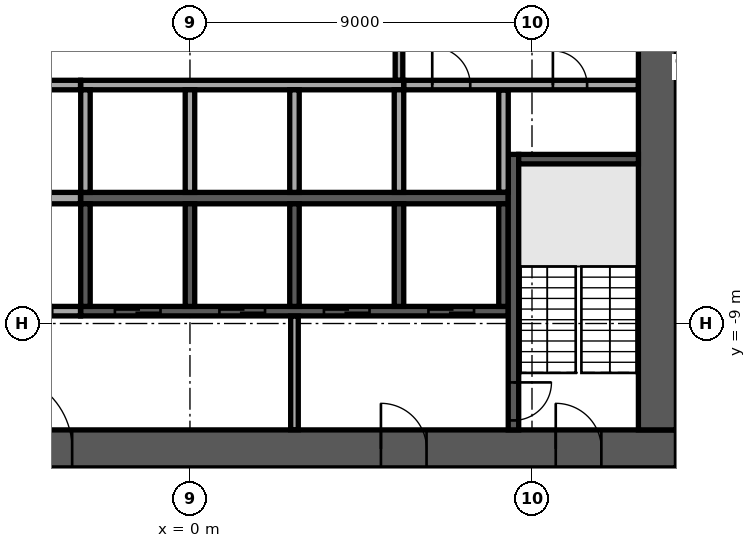
"""IFC4 building model, lengths in metres.
Left out: names, types, materials, properties, quantities, classifications, styles, units other than length and angle.
Written with IfcOpenShell. Run it as: python <this file> out.ifc"""

import sys

from ifc_helpers import new_model, si_unit, direction, frame, frame_2d, origin, place, context, subcontext, project, spatial, rectangle, extrude, element, fill, save


model = new_model("IFC4")
c1 = context("Model", 3, precision=1e-05, world=origin(), true_north=direction((0.0, 1.0)))
c2 = subcontext(c1, "Body", "Model", "MODEL_VIEW")
j1 = project(units=[si_unit("LENGTHUNIT", "METRE"), si_unit("PLANEANGLEUNIT", "RADIAN")], contexts=[c1])
p1 = place(None, origin())
s1 = spatial("IfcSite", under=j1, at=p1, CompositionType="ELEMENT")
p2 = place(p1, origin())
s2 = spatial("IfcBuilding", under=s1, at=p2, CompositionType="ELEMENT")
p3 = place(p2, frame((0.0, 0.0, 163.7)))
s3 = spatial("IfcBuildingStorey", under=s2, at=p3, CompositionType="ELEMENT", Elevation=163.7)
p4 = place(p3, frame((-12.8, -12.3, 0.0), z_axis=(0.0, 0.0, 1.0), x_axis=(1.0, 0.0, 0.0)))
e1 = element("IfcWall", 1, at=p4, inside=s3, PredefinedType="SHEAR", context=c2, shape_type="SweptSolid", body=[
    extrude(rectangle(XDim=25.6, YDim=1.0, at=frame_2d((12.8, 0.0))), origin(), (0.0, 0.0, 1.0), 3.6),
])
p5 = place(p4, frame((7.7, 0.0, 0.0)))
e2 = element("IfcOpeningElement", 2, at=p5, cuts=e1, PredefinedType="OPENING", context=c2, shape_type="SweptSolid", body=[
    extrude(rectangle(XDim=2.0, YDim=2.1, at=frame_2d((1.0, 1.05))), frame((0.0, 0.51, 0.0), z_axis=(0.0, -1.0, 0.0), x_axis=(1.0, 0.0, 0.0)), (0.0, 0.0, 1.0), 1.02),
])
p6 = place(p4, frame((17.825, 0.0, 0.0)))
e3 = element("IfcOpeningElement", 3, at=p6, cuts=e1, PredefinedType="OPENING", context=c2, shape_type="SweptSolid", body=[
    extrude(rectangle(XDim=1.2, YDim=2.1, at=frame_2d((0.6, 1.05))), frame((0.0, 0.51, 0.0), z_axis=(0.0, -1.0, 0.0), x_axis=(1.0, 0.0, 0.0)), (0.0, 0.0, 1.0), 1.02),
])
p7 = place(p4, frame((1.975, 0.0, 0.0)))
e4 = element("IfcOpeningElement", 4, at=p7, cuts=e1, PredefinedType="OPENING", context=c2, shape_type="SweptSolid", body=[
    extrude(rectangle(XDim=1.2, YDim=2.1, at=frame_2d((0.6, 1.05))), frame((0.0, 0.51, 0.0), z_axis=(0.0, -1.0, 0.0), x_axis=(1.0, 0.0, 0.0)), (0.0, 0.0, 1.0), 1.02),
])
p8 = place(p4, frame((22.425, 0.0, 0.0)))
e5 = element("IfcOpeningElement", 5, at=p8, cuts=e1, PredefinedType="OPENING", context=c2, shape_type="SweptSolid", body=[
    extrude(rectangle(XDim=1.2, YDim=2.1, at=frame_2d((0.6, 1.05))), frame((0.0, 0.51, 0.0), z_axis=(0.0, -1.0, 0.0), x_axis=(1.0, 0.0, 0.0)), (0.0, 0.0, 1.0), 1.02),
])
p9 = place(p3, frame((12.3, -11.8, 0.0), z_axis=(0.0, 0.0, 1.0), x_axis=(0.0, 1.0, 0.0)))
e6 = element("IfcWall", 6, at=p9, inside=s3, PredefinedType="SHEAR", context=c2, shape_type="SweptSolid", body=[
    extrude(rectangle(XDim=23.6, YDim=1.0, at=frame_2d((11.8, 0.0))), origin(), (0.0, 0.0, 1.0), 3.6),
])
p10 = place(p9, frame((10.6, 0.0, 0.0)))
e7 = element("IfcOpeningElement", 7, at=p10, cuts=e6, PredefinedType="OPENING", context=c2, shape_type="SweptSolid", body=[
    extrude(rectangle(XDim=2.4, YDim=2.4, at=frame_2d((1.2, 1.2))), frame((0.0, 0.51, 0.0), z_axis=(0.0, -1.0, 0.0), x_axis=(1.0, 0.0, 0.0)), (0.0, 0.0, 1.0), 1.02),
])
p11 = place(p3, frame((-2.875, -5.7, 0.0), z_axis=(0.0, 0.0, 1.0), x_axis=(1.0, 0.0, 0.0)))
e8 = element("IfcWall", 8, at=p11, inside=s3, PredefinedType="SOLIDWALL", context=c2, shape_type="SweptSolid", body=[
    extrude(rectangle(XDim=11.25, YDim=0.3, at=frame_2d((5.625, 0.0))), origin(), (0.0, 0.0, 1.0), 3.6),
])
p12 = place(p3, frame((-2.875, -2.725, 0.0), z_axis=(0.0, 0.0, 1.0), x_axis=(1.0, 0.0, 0.0)))
e9 = element("IfcWall", 9, at=p12, inside=s3, PredefinedType="SOLIDWALL", context=c2, shape_type="SweptSolid", body=[
    extrude(rectangle(XDim=8.5, YDim=0.25, at=frame_2d((4.25, 0.0))), origin(), (0.0, 0.0, 1.0), 3.6),
])
for number, where, z_axis, x_axis in (
    (10, (-2.75, -5.55, 0.0), (0.0, 0.0, 1.0), (0.0, 1.0, 0.0)),
    (11, (0.0, -5.55, 0.0), (0.0, 0.0, 1.0), (0.0, 1.0, 0.0)),
    (12, (2.75, -5.55, 0.0), (0.0, 0.0, 1.0), (0.0, 1.0, 0.0)),
    (13, (5.5, -5.55, 0.0), (0.0, 0.0, 1.0), (0.0, 1.0, 0.0)),
):
    element("IfcWall", number, at=place(p3, frame(where, z_axis=z_axis, x_axis=x_axis)), inside=s3, PredefinedType="SOLIDWALL", context=c2, shape_type="SweptSolid", body=[
        extrude(rectangle(XDim=2.7, YDim=0.25, at=frame_2d((1.35, 0.0))), origin(), (0.0, 0.0, 1.0), 3.6),
    ])
p13 = place(p3, frame((-2.875, -8.675, 0.0), z_axis=(0.0, 0.0, 1.0), x_axis=(1.0, 0.0, 0.0)))
e14 = element("IfcWall", 14, at=p13, inside=s3, PredefinedType="SOLIDWALL", context=c2, shape_type="SweptSolid", body=[
    extrude(rectangle(XDim=11.25, YDim=0.25, at=frame_2d((5.625, 0.0))), origin(), (0.0, 0.0, 1.0), 3.6),
])
p14 = place(p13, frame((0.9, 0.0, 0.0)))
e15 = element("IfcOpeningElement", 15, at=p14, cuts=e14, PredefinedType="OPENING", context=c2, shape_type="SweptSolid", body=[
    extrude(rectangle(XDim=1.2, YDim=2.1, at=frame_2d((0.6, 1.05))), frame((0.0, 0.135, 0.0), z_axis=(0.0, -1.0, 0.0), x_axis=(1.0, 0.0, 0.0)), (0.0, 0.0, 1.0), 0.27),
])
p15 = place(p13, frame((3.65, 0.0, 0.0)))
e16 = element("IfcOpeningElement", 16, at=p15, cuts=e14, PredefinedType="OPENING", context=c2, shape_type="SweptSolid", body=[
    extrude(rectangle(XDim=1.2, YDim=2.1, at=frame_2d((0.6, 1.05))), frame((0.0, 0.135, 0.0), z_axis=(0.0, -1.0, 0.0), x_axis=(1.0, 0.0, 0.0)), (0.0, 0.0, 1.0), 0.27),
])
p16 = place(p13, frame((6.4, 0.0, 0.0)))
e17 = element("IfcOpeningElement", 17, at=p16, cuts=e14, PredefinedType="OPENING", context=c2, shape_type="SweptSolid", body=[
    extrude(rectangle(XDim=1.2, YDim=2.1, at=frame_2d((0.6, 1.05))), frame((0.0, 0.135, 0.0), z_axis=(0.0, -1.0, 0.0), x_axis=(1.0, 0.0, 0.0)), (0.0, 0.0, 1.0), 0.27),
])
p17 = place(p13, frame((9.15, 0.0, 0.0)))
e18 = element("IfcOpeningElement", 18, at=p17, cuts=e14, PredefinedType="OPENING", context=c2, shape_type="SweptSolid", body=[
    extrude(rectangle(XDim=1.2, YDim=2.1, at=frame_2d((0.6, 1.05))), frame((0.0, 0.135, 0.0), z_axis=(0.0, -1.0, 0.0), x_axis=(1.0, 0.0, 0.0)), (0.0, 0.0, 1.0), 0.27),
])
for number, where, z_axis, x_axis in (
    (19, (-2.75, -8.55, 0.0), (0.0, 0.0, 1.0), (0.0, 1.0, 0.0)),
    (20, (0.0, -8.55, 0.0), (0.0, 0.0, 1.0), (0.0, 1.0, 0.0)),
    (21, (2.75, -8.55, 0.0), (0.0, 0.0, 1.0), (0.0, 1.0, 0.0)),
    (22, (5.5, -8.55, 0.0), (0.0, 0.0, 1.0), (0.0, 1.0, 0.0)),
    (23, (8.25, -8.55, 0.0), (0.0, 0.0, 1.0), (0.0, 1.0, 0.0)),
):
    element("IfcWall", number, at=place(p3, frame(where, z_axis=z_axis, x_axis=x_axis)), inside=s3, PredefinedType="SOLIDWALL", context=c2, shape_type="SweptSolid", body=[
        extrude(rectangle(XDim=2.7, YDim=0.25, at=frame_2d((1.35, 0.0))), origin(), (0.0, 0.0, 1.0), 3.6),
    ])
p18 = place(p3, frame((8.512, -4.55, 0.0), z_axis=(0.0, 0.0, 1.0), x_axis=(0.0, -1.0, 0.0)))
e24 = element("IfcWall", 24, at=p18, inside=s3, PredefinedType="SOLIDWALL", context=c2, shape_type="SweptSolid", body=[
    extrude(rectangle(XDim=7.25, YDim=0.275, at=frame_2d((3.625, 0.0))), origin(), (0.0, 0.0, 1.0), 3.6),
])
p19 = place(p18, frame((6.0, 0.0, 0.0)))
e25 = element("IfcOpeningElement", 25, at=p19, cuts=e24, PredefinedType="OPENING", context=c2, shape_type="SweptSolid", body=[
    extrude(rectangle(XDim=1.0, YDim=2.1, at=frame_2d((0.5, 1.05))), frame((0.0, 0.147, 0.0), z_axis=(0.0, -1.0, 0.0), x_axis=(1.0, 0.0, 0.0)), (0.0, 0.0, 1.0), 0.295),
])
p20 = place(p3, frame((8.65, -4.675, 0.0), z_axis=(0.0, 0.0, 1.0), x_axis=(1.0, 0.0, 0.0)))
e26 = element("IfcWall", 26, at=p20, inside=s3, PredefinedType="SOLIDWALL", context=c2, shape_type="SweptSolid", body=[
    extrude(rectangle(XDim=3.15, YDim=0.25, at=frame_2d((1.575, 0.0))), origin(), (0.0, 0.0, 1.0), 3.6),
])
p21 = place(p3, frame((2.75, -11.795, 0.0), z_axis=(0.0, 0.0, 1.0), x_axis=(0.0, 1.0, 0.0)))
e27 = element("IfcWall", 27, at=p21, inside=s3, PredefinedType="PARTITIONING", context=c2, shape_type="SweptSolid", body=[
    extrude(rectangle(XDim=2.99, YDim=0.2, at=frame_2d((1.495, 0.0))), origin(), (0.0, 0.0, 1.0), 3.6),
])
p22 = place(p3, frame((-8.37, -8.675, 0.0), z_axis=(0.0, 0.0, 1.0), x_axis=(1.0, 0.0, 0.0)))
e28 = element("IfcWall", 28, at=p22, inside=s3, PredefinedType="PARTITIONING", context=c2, shape_type="SweptSolid", body=[
    extrude(rectangle(XDim=5.49, YDim=0.25, at=frame_2d((2.745, 0.0))), origin(), (0.0, 0.0, 1.0), 3.6),
])
p23 = place(p22, frame((0.995, 0.0, 0.0)))
e29 = element("IfcOpeningElement", 29, at=p23, cuts=e28, PredefinedType="OPENING", context=c2, shape_type="SweptSolid", body=[
    extrude(rectangle(XDim=1.0, YDim=2.1, at=frame_2d((0.5, 1.05))), frame((0.0, 0.135, 0.0), z_axis=(0.0, -1.0, 0.0), x_axis=(1.0, 0.0, 0.0)), (0.0, 0.0, 1.0), 0.27),
])
p24 = place(p22, frame((3.745, 0.0, 0.0)))
e30 = element("IfcOpeningElement", 30, at=p24, cuts=e28, PredefinedType="OPENING", context=c2, shape_type="SweptSolid", body=[
    extrude(rectangle(XDim=1.0, YDim=2.1, at=frame_2d((0.5, 1.05))), frame((0.0, 0.135, 0.0), z_axis=(0.0, -1.0, 0.0), x_axis=(1.0, 0.0, 0.0)), (0.0, 0.0, 1.0), 0.27),
])
p25 = place(p3, frame((-8.35, -5.7, 0.0), z_axis=(0.0, 0.0, 1.0), x_axis=(1.0, 0.0, 0.0)))
e31 = element("IfcWall", 31, at=p25, inside=s3, PredefinedType="PARTITIONING", context=c2, shape_type="SweptSolid", body=[
    extrude(rectangle(XDim=5.47, YDim=0.3, at=frame_2d((2.735, 0.0))), origin(), (0.0, 0.0, 1.0), 3.6),
])
p26 = place(p3, frame((8.25, -5.545, 0.0), z_axis=(0.0, 0.0, 1.0), x_axis=(0.0, 1.0, 0.0)))
e32 = element("IfcWall", 32, at=p26, inside=s3, PredefinedType="PARTITIONING", context=c2, shape_type="SweptSolid", body=[
    extrude(rectangle(XDim=2.69, YDim=0.25, at=frame_2d((1.345, 0.0))), origin(), (0.0, 0.0, 1.0), 3.6),
])
p27 = place(p3, frame((-11.795, -2.725, 0.0), z_axis=(0.0, 0.0, 1.0), x_axis=(1.0, 0.0, 0.0)))
e33 = element("IfcWall", 33, at=p27, inside=s3, PredefinedType="PARTITIONING", context=c2, shape_type="SweptSolid", body=[
    extrude(rectangle(XDim=8.915, YDim=0.25, at=frame_2d((4.458, 0.0))), origin(), (0.0, 0.0, 1.0), 3.6),
])
p28 = place(p27, frame((1.295, 0.0, 0.0)))
e34 = element("IfcOpeningElement", 34, at=p28, cuts=e33, PredefinedType="OPENING", context=c2, shape_type="SweptSolid", body=[
    extrude(rectangle(XDim=1.0, YDim=2.1, at=frame_2d((0.5, 1.05))), frame((0.0, 0.135, 0.0), z_axis=(0.0, -1.0, 0.0), x_axis=(1.0, 0.0, 0.0)), (0.0, 0.0, 1.0), 0.27),
])
p29 = place(p27, frame((4.42, 0.0, 0.0)))
e35 = element("IfcOpeningElement", 35, at=p29, cuts=e33, PredefinedType="OPENING", context=c2, shape_type="SweptSolid", body=[
    extrude(rectangle(XDim=1.0, YDim=2.1, at=frame_2d((0.5, 1.05))), frame((0.0, 0.135, 0.0), z_axis=(0.0, -1.0, 0.0), x_axis=(1.0, 0.0, 0.0)), (0.0, 0.0, 1.0), 0.27),
])
p30 = place(p3, frame((5.63, -2.725, 0.0), z_axis=(0.0, 0.0, 1.0), x_axis=(1.0, 0.0, 0.0)))
e36 = element("IfcWall", 36, at=p30, inside=s3, PredefinedType="PARTITIONING", context=c2, shape_type="SweptSolid", body=[
    extrude(rectangle(XDim=6.165, YDim=0.25, at=frame_2d((3.083, 0.0))), origin(), (0.0, 0.0, 1.0), 3.6),
])
p31 = place(p30, frame((0.745, 0.0, 0.0)))
e37 = element("IfcOpeningElement", 37, at=p31, cuts=e36, PredefinedType="OPENING", context=c2, shape_type="SweptSolid", body=[
    extrude(rectangle(XDim=1.0, YDim=2.1, at=frame_2d((0.5, 1.05))), frame((0.0, 0.135, 0.0), z_axis=(0.0, -1.0, 0.0), x_axis=(1.0, 0.0, 0.0)), (0.0, 0.0, 1.0), 0.27),
])
p32 = place(p30, frame((3.92, 0.0, 0.0)))
e38 = element("IfcOpeningElement", 38, at=p32, cuts=e36, PredefinedType="OPENING", context=c2, shape_type="SweptSolid", body=[
    extrude(rectangle(XDim=0.9, YDim=2.1, at=frame_2d((0.45, 1.05))), frame((0.0, 0.135, 0.0), z_axis=(0.0, -1.0, 0.0), x_axis=(1.0, 0.0, 0.0)), (0.0, 0.0, 1.0), 0.27),
])
p33 = place(p3, frame((5.5, -2.595, 0.0), z_axis=(0.0, 0.0, 1.0), x_axis=(0.0, 1.0, 0.0)))
e39 = element("IfcWall", 39, at=p33, inside=s3, PredefinedType="PARTITIONING", context=c2, shape_type="SweptSolid", body=[
    extrude(rectangle(XDim=5.19, YDim=0.2, at=frame_2d((2.595, 0.0))), origin(), (0.0, 0.0, 1.0), 3.6),
])
p34 = place(p33, frame((1.395, 0.0, 0.0)))
e40 = element("IfcOpeningElement", 40, at=p34, cuts=e39, PredefinedType="OPENING", context=c2, shape_type="SweptSolid", body=[
    extrude(rectangle(XDim=2.4, YDim=2.4, at=frame_2d((1.2, 1.2))), frame((0.0, 0.11, 0.0), z_axis=(0.0, -1.0, 0.0), x_axis=(1.0, 0.0, 0.0)), (0.0, 0.0, 1.0), 0.22),
])
p35 = place(p3, frame((-4.784, -35.737, 0.0), z_axis=(0.0, 0.0, 1.0), x_axis=(0.809019283075, 0.587782102154, 0.0)))
e41 = element("IfcWall", 41, at=p35, inside=s3, PredefinedType="STANDARD", context=c2, shape_type="SweptSolid", body=[
    extrude(rectangle(XDim=49.751, YDim=0.6, at=frame_2d((24.875, 0.0))), origin(), (0.0, 0.0, 1.0), 3.6),
])
p36 = place(p35, frame((1.161, 0.0, 0.9)))
e42 = element("IfcOpeningElement", 42, at=p36, cuts=e41, PredefinedType="OPENING", context=c2, shape_type="SweptSolid", body=[
    extrude(rectangle(XDim=2.1, YDim=2.1, at=frame_2d((1.05, 1.05))), frame((0.0, 0.31, 0.0), z_axis=(0.0, -1.0, 0.0), x_axis=(1.0, 0.0, 0.0)), (0.0, 0.0, 1.0), 0.62),
])
p37 = place(p35, frame((5.644, 0.0, 0.9)))
e43 = element("IfcOpeningElement", 43, at=p37, cuts=e41, PredefinedType="OPENING", context=c2, shape_type="SweptSolid", body=[
    extrude(rectangle(XDim=2.1, YDim=2.1, at=frame_2d((1.05, 1.05))), frame((0.0, 0.31, 0.0), z_axis=(0.0, -1.0, 0.0), x_axis=(1.0, 0.0, 0.0)), (0.0, 0.0, 1.0), 0.62),
])
p38 = place(p35, frame((10.189, 0.0, 0.9)))
e44 = element("IfcOpeningElement", 44, at=p38, cuts=e41, PredefinedType="OPENING", context=c2, shape_type="SweptSolid", body=[
    extrude(rectangle(XDim=2.1, YDim=2.1, at=frame_2d((1.05, 1.05))), frame((0.0, 0.31, 0.0), z_axis=(0.0, -1.0, 0.0), x_axis=(1.0, 0.0, 0.0)), (0.0, 0.0, 1.0), 0.62),
])
p39 = place(p35, frame((14.735, 0.0, 0.9)))
e45 = element("IfcOpeningElement", 45, at=p39, cuts=e41, PredefinedType="OPENING", context=c2, shape_type="SweptSolid", body=[
    extrude(rectangle(XDim=2.1, YDim=2.1, at=frame_2d((1.05, 1.05))), frame((0.0, 0.31, 0.0), z_axis=(0.0, -1.0, 0.0), x_axis=(1.0, 0.0, 0.0)), (0.0, 0.0, 1.0), 0.62),
])
p40 = place(p35, frame((19.28, 0.0, 0.9)))
e46 = element("IfcOpeningElement", 46, at=p40, cuts=e41, PredefinedType="OPENING", context=c2, shape_type="SweptSolid", body=[
    extrude(rectangle(XDim=2.1, YDim=2.1, at=frame_2d((1.05, 1.05))), frame((0.0, 0.31, 0.0), z_axis=(0.0, -1.0, 0.0), x_axis=(1.0, 0.0, 0.0)), (0.0, 0.0, 1.0), 0.62),
])
p41 = place(p35, frame((23.826, 0.0, 0.9)))
e47 = element("IfcOpeningElement", 47, at=p41, cuts=e41, PredefinedType="OPENING", context=c2, shape_type="SweptSolid", body=[
    extrude(rectangle(XDim=2.1, YDim=2.1, at=frame_2d((1.05, 1.05))), frame((0.0, 0.31, 0.0), z_axis=(0.0, -1.0, 0.0), x_axis=(1.0, 0.0, 0.0)), (0.0, 0.0, 1.0), 0.62),
])
p42 = place(p35, frame((28.371, 0.0, 0.9)))
e48 = element("IfcOpeningElement", 48, at=p42, cuts=e41, PredefinedType="OPENING", context=c2, shape_type="SweptSolid", body=[
    extrude(rectangle(XDim=2.1, YDim=2.1, at=frame_2d((1.05, 1.05))), frame((0.0, 0.31, 0.0), z_axis=(0.0, -1.0, 0.0), x_axis=(1.0, 0.0, 0.0)), (0.0, 0.0, 1.0), 0.62),
])
p43 = place(p35, frame((32.917, 0.0, 0.9)))
e49 = element("IfcOpeningElement", 49, at=p43, cuts=e41, PredefinedType="OPENING", context=c2, shape_type="SweptSolid", body=[
    extrude(rectangle(XDim=2.1, YDim=2.1, at=frame_2d((1.05, 1.05))), frame((0.0, 0.31, 0.0), z_axis=(0.0, -1.0, 0.0), x_axis=(1.0, 0.0, 0.0)), (0.0, 0.0, 1.0), 0.62),
])
p44 = place(p35, frame((37.462, 0.0, 0.9)))
e50 = element("IfcOpeningElement", 50, at=p44, cuts=e41, PredefinedType="OPENING", context=c2, shape_type="SweptSolid", body=[
    extrude(rectangle(XDim=2.1, YDim=2.1, at=frame_2d((1.05, 1.05))), frame((0.0, 0.31, 0.0), z_axis=(0.0, -1.0, 0.0), x_axis=(1.0, 0.0, 0.0)), (0.0, 0.0, 1.0), 0.62),
])
p45 = place(p35, frame((42.008, 0.0, 0.9)))
e51 = element("IfcOpeningElement", 51, at=p45, cuts=e41, PredefinedType="OPENING", context=c2, shape_type="SweptSolid", body=[
    extrude(rectangle(XDim=2.1, YDim=2.1, at=frame_2d((1.05, 1.05))), frame((0.0, 0.31, 0.0), z_axis=(0.0, -1.0, 0.0), x_axis=(1.0, 0.0, 0.0)), (0.0, 0.0, 1.0), 0.62),
])
p46 = place(p35, frame((46.491, 0.0, 0.9)))
e52 = element("IfcOpeningElement", 52, at=p46, cuts=e41, PredefinedType="OPENING", context=c2, shape_type="SweptSolid", body=[
    extrude(rectangle(XDim=2.1, YDim=2.1, at=frame_2d((1.05, 1.05))), frame((0.0, 0.31, 0.0), z_axis=(0.0, -1.0, 0.0), x_axis=(1.0, 0.0, 0.0)), (0.0, 0.0, 1.0), 0.62),
])
p47 = place(p3, frame((-3.509, -26.309, 0.0), z_axis=(0.0, 0.0, 1.0), x_axis=(0.809024097608, 0.587775475407, 0.0)))
e53 = element("IfcWall", 53, at=p47, inside=s3, PredefinedType="PARTITIONING", context=c2, shape_type="SweptSolid", body=[
    extrude(rectangle(XDim=36.68, YDim=0.15, at=frame_2d((18.34, 0.0))), origin(), (0.0, 0.0, 1.0), 3.15),
])
p48 = place(p47, frame((5.361, 0.0, 0.0)))
e54 = element("IfcOpeningElement", 54, at=p48, cuts=e53, PredefinedType="OPENING", context=c2, shape_type="SweptSolid", body=[
    extrude(rectangle(XDim=1.0, YDim=2.1, at=frame_2d((0.5, 1.05))), frame((0.0, 0.085, 0.0), z_axis=(0.0, -1.0, 0.0), x_axis=(1.0, 0.0, 0.0)), (0.0, 0.0, 1.0), 0.17),
])
p49 = place(p47, frame((12.913, 0.0, 0.0)))
e55 = element("IfcOpeningElement", 55, at=p49, cuts=e53, PredefinedType="OPENING", context=c2, shape_type="SweptSolid", body=[
    extrude(rectangle(XDim=1.0, YDim=2.1, at=frame_2d((0.5, 1.05))), frame((0.0, 0.085, 0.0), z_axis=(0.0, -1.0, 0.0), x_axis=(1.0, 0.0, 0.0)), (0.0, 0.0, 1.0), 0.17),
])
p50 = place(p47, frame((27.576, 0.0, 0.0)))
e56 = element("IfcOpeningElement", 56, at=p50, cuts=e53, PredefinedType="OPENING", context=c2, shape_type="SweptSolid", body=[
    extrude(rectangle(XDim=1.0, YDim=2.1, at=frame_2d((0.5, 1.05))), frame((0.0, 0.085, 0.0), z_axis=(0.0, -1.0, 0.0), x_axis=(1.0, 0.0, 0.0)), (0.0, 0.0, 1.0), 0.17),
])
p51 = place(p5, origin())
e57 = element("IfcDoor", 57, at=p51, inside=s3, OperationType="SINGLE_SWING_LEFT", PredefinedType="DOOR", context=c2, shape_type="SweptSolid", body=[
    extrude(rectangle(XDim=2.0, YDim=2.1, at=frame_2d((1.0, 1.05))), frame((0.0, 0.025, 0.0), z_axis=(0.0, -1.0, 0.0), x_axis=(1.0, 0.0, 0.0)), (0.0, 0.0, 1.0), 0.05),
])
fill(e2, e57)
p52 = place(p6, origin())
e58 = element("IfcDoor", 58, at=p52, inside=s3, OperationType="SINGLE_SWING_LEFT", PredefinedType="DOOR", context=c2, shape_type="SweptSolid", body=[
    extrude(rectangle(XDim=1.2, YDim=2.1, at=frame_2d((0.6, 1.05))), frame((0.0, 0.025, 0.0), z_axis=(0.0, -1.0, 0.0), x_axis=(1.0, 0.0, 0.0)), (0.0, 0.0, 1.0), 0.05),
])
fill(e3, e58)
p53 = place(p8, origin())
e59 = element("IfcDoor", 59, at=p53, inside=s3, OperationType="SINGLE_SWING_LEFT", PredefinedType="DOOR", context=c2, shape_type="SweptSolid", body=[
    extrude(rectangle(XDim=1.2, YDim=2.1, at=frame_2d((0.6, 1.05))), frame((0.0, 0.025, 0.0), z_axis=(0.0, -1.0, 0.0), x_axis=(1.0, 0.0, 0.0)), (0.0, 0.0, 1.0), 0.05),
])
fill(e5, e59)
p54 = place(p14, origin())
e60 = element("IfcDoor", 60, at=p54, inside=s3, OperationType="DOUBLE_DOOR_SLIDING", PredefinedType="DOOR", context=c2, shape_type="SweptSolid", body=[
    extrude(rectangle(XDim=1.2, YDim=2.1, at=frame_2d((0.6, 1.05))), frame((0.0, 0.025, 0.0), z_axis=(0.0, -1.0, 0.0), x_axis=(1.0, 0.0, 0.0)), (0.0, 0.0, 1.0), 0.05),
])
fill(e15, e60)
p55 = place(p15, origin())
e61 = element("IfcDoor", 61, at=p55, inside=s3, OperationType="DOUBLE_DOOR_SLIDING", PredefinedType="DOOR", context=c2, shape_type="SweptSolid", body=[
    extrude(rectangle(XDim=1.2, YDim=2.1, at=frame_2d((0.6, 1.05))), frame((0.0, 0.025, 0.0), z_axis=(0.0, -1.0, 0.0), x_axis=(1.0, 0.0, 0.0)), (0.0, 0.0, 1.0), 0.05),
])
fill(e16, e61)
p56 = place(p16, origin())
e62 = element("IfcDoor", 62, at=p56, inside=s3, OperationType="DOUBLE_DOOR_SLIDING", PredefinedType="DOOR", context=c2, shape_type="SweptSolid", body=[
    extrude(rectangle(XDim=1.2, YDim=2.1, at=frame_2d((0.6, 1.05))), frame((0.0, 0.025, 0.0), z_axis=(0.0, -1.0, 0.0), x_axis=(1.0, 0.0, 0.0)), (0.0, 0.0, 1.0), 0.05),
])
fill(e17, e62)
p57 = place(p17, origin())
e63 = element("IfcDoor", 63, at=p57, inside=s3, OperationType="DOUBLE_DOOR_SLIDING", PredefinedType="DOOR", context=c2, shape_type="SweptSolid", body=[
    extrude(rectangle(XDim=1.2, YDim=2.1, at=frame_2d((0.6, 1.05))), frame((0.0, 0.025, 0.0), z_axis=(0.0, -1.0, 0.0), x_axis=(1.0, 0.0, 0.0)), (0.0, 0.0, 1.0), 0.05),
])
fill(e18, e63)
p58 = place(p19, origin())
e64 = element("IfcDoor", 64, at=p58, inside=s3, OperationType="SINGLE_SWING_LEFT", PredefinedType="DOOR", context=c2, shape_type="SweptSolid", body=[
    extrude(rectangle(XDim=1.0, YDim=2.1, at=frame_2d((0.5, 1.05))), frame((0.0, 0.025, 0.0), z_axis=(0.0, -1.0, 0.0), x_axis=(1.0, 0.0, 0.0)), (0.0, 0.0, 1.0), 0.05),
])
fill(e25, e64)
p59 = place(p31, origin())
e65 = element("IfcDoor", 65, at=p59, inside=s3, OperationType="SINGLE_SWING_LEFT", PredefinedType="DOOR", context=c2, shape_type="SweptSolid", body=[
    extrude(rectangle(XDim=1.0, YDim=2.1, at=frame_2d((0.5, 1.05))), frame((0.0, 0.025, 0.0), z_axis=(0.0, -1.0, 0.0), x_axis=(1.0, 0.0, 0.0)), (0.0, 0.0, 1.0), 0.05),
])
fill(e37, e65)
p60 = place(p32, origin())
e66 = element("IfcDoor", 66, at=p60, inside=s3, OperationType="SINGLE_SWING_LEFT", PredefinedType="DOOR", context=c2, shape_type="SweptSolid", body=[
    extrude(rectangle(XDim=0.9, YDim=2.1, at=frame_2d((0.45, 1.05))), frame((0.0, 0.025, 0.0), z_axis=(0.0, -1.0, 0.0), x_axis=(1.0, 0.0, 0.0)), (0.0, 0.0, 1.0), 0.05),
])
fill(e38, e66)
save(model, sys.argv[1])
